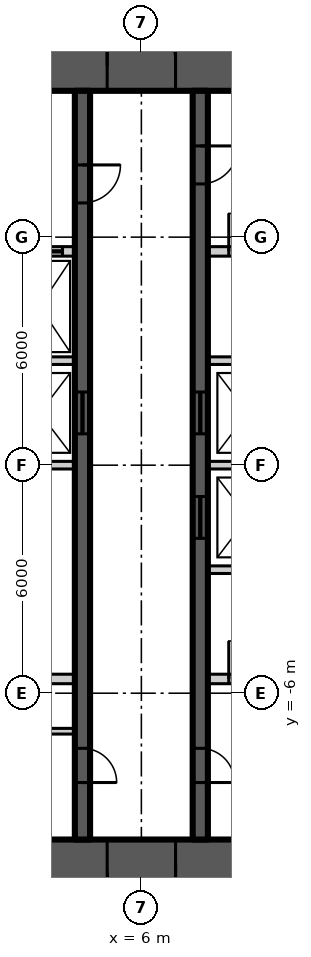
"""IFC4 building model, lengths in metres.
Left out: names, types, materials, properties, quantities, classifications, styles, units other than length and angle.
Written with IfcOpenShell. Run it as: python <this file> out.ifc"""

import sys

from ifc_helpers import new_model, si_unit, direction, frame, frame_2d, origin, place, context, subcontext, project, spatial, rectangle, extrude, element, fill, save


model = new_model("IFC4")
c1 = context("Model", 3, precision=1e-05, world=origin(), true_north=direction((0.0, 1.0)))
c2 = subcontext(c1, "Body", "Model", "MODEL_VIEW")
j1 = project(units=[si_unit("LENGTHUNIT", "METRE"), si_unit("PLANEANGLEUNIT", "RADIAN")], contexts=[c1])
p1 = place(None, origin())
s1 = spatial("IfcSite", under=j1, at=p1, CompositionType="ELEMENT")
p2 = place(p1, origin())
s2 = spatial("IfcBuilding", under=s1, at=p2, CompositionType="ELEMENT")
p3 = place(p2, frame((0.0, 0.0, 294.6)))
s3 = spatial("IfcBuildingStorey", under=s2, at=p3, CompositionType="ELEMENT", Elevation=294.6)
p4 = place(p3, frame((-11.15, 10.5, 0.0), z_axis=(0.0, 0.0, 1.0), x_axis=(1.0, 0.0, 0.0)))
e1 = element("IfcWall", 1, at=p4, inside=s3, PredefinedType="SHEAR", context=c2, shape_type="SweptSolid", body=[
    extrude(rectangle(XDim=22.3, YDim=1.3, at=frame_2d((11.15, 0.0))), origin(), (0.0, 0.0, 1.0), 3.9),
])
p5 = place(p4, frame((4.25, 0.0, 0.0)))
e2 = element("IfcOpeningElement", 2, at=p5, cuts=e1, PredefinedType="OPENING", context=c2, shape_type="SweptSolid", body=[
    extrude(rectangle(XDim=1.8, YDim=2.2, at=frame_2d((0.9, 1.1))), frame((0.0, 0.66, 0.0), z_axis=(0.0, -1.0, 0.0), x_axis=(1.0, 0.0, 0.0)), (0.0, 0.0, 1.0), 1.32),
])
p6 = place(p4, frame((16.25, 0.0, 0.0)))
e3 = element("IfcOpeningElement", 3, at=p6, cuts=e1, PredefinedType="OPENING", context=c2, shape_type="SweptSolid", body=[
    extrude(rectangle(XDim=1.8, YDim=2.2, at=frame_2d((0.9, 1.1))), frame((0.0, 0.66, 0.0), z_axis=(0.0, -1.0, 0.0), x_axis=(1.0, 0.0, 0.0)), (0.0, 0.0, 1.0), 1.32),
])
p7 = place(p3, frame((11.15, -10.5, 0.0), z_axis=(0.0, 0.0, 1.0), x_axis=(-1.0, 0.0, 0.0)))
e4 = element("IfcWall", 4, at=p7, inside=s3, PredefinedType="SHEAR", context=c2, shape_type="SweptSolid", body=[
    extrude(rectangle(XDim=22.3, YDim=1.3, at=frame_2d((11.15, 0.0))), origin(), (0.0, 0.0, 1.0), 3.9),
])
p8 = place(p7, frame((16.25, 0.0, 0.0)))
e5 = element("IfcOpeningElement", 5, at=p8, cuts=e4, PredefinedType="OPENING", context=c2, shape_type="SweptSolid", body=[
    extrude(rectangle(XDim=1.8, YDim=2.2, at=frame_2d((0.9, 1.1))), frame((0.0, 0.66, 0.0), z_axis=(0.0, -1.0, 0.0), x_axis=(1.0, 0.0, 0.0)), (0.0, 0.0, 1.0), 1.32),
])
p9 = place(p7, frame((4.25, 0.0, 0.0)))
e6 = element("IfcOpeningElement", 6, at=p9, cuts=e4, PredefinedType="OPENING", context=c2, shape_type="SweptSolid", body=[
    extrude(rectangle(XDim=1.8, YDim=2.2, at=frame_2d((0.9, 1.1))), frame((0.0, 0.66, 0.0), z_axis=(0.0, -1.0, 0.0), x_axis=(1.0, 0.0, 0.0)), (0.0, 0.0, 1.0), 1.32),
])
p10 = place(p3, frame((7.55, 9.85, 0.0), z_axis=(0.0, 0.0, 1.0), x_axis=(0.0, -1.0, 0.0)))
e7 = element("IfcWall", 7, at=p10, inside=s3, PredefinedType="SHEAR", context=c2, shape_type="SweptSolid", body=[
    extrude(rectangle(XDim=19.7, YDim=0.4, at=frame_2d((9.85, 0.0))), origin(), (0.0, 0.0, 1.0), 3.9),
])
p11 = place(p10, frame((1.45, 0.0, 0.0)))
e8 = element("IfcOpeningElement", 8, at=p11, cuts=e7, PredefinedType="OPENING", context=c2, shape_type="SweptSolid", body=[
    extrude(rectangle(XDim=1.0, YDim=2.2, at=frame_2d((0.5, 1.1))), frame((0.0, 0.21, 0.0), z_axis=(0.0, -1.0, 0.0), x_axis=(1.0, 0.0, 0.0)), (0.0, 0.0, 1.0), 0.42),
])
p12 = place(p10, frame((17.3, 0.0, 0.0)))
e9 = element("IfcOpeningElement", 9, at=p12, cuts=e7, PredefinedType="OPENING", context=c2, shape_type="SweptSolid", body=[
    extrude(rectangle(XDim=0.9, YDim=2.1, at=frame_2d((0.45, 1.05))), frame((0.0, 0.21, 0.0), z_axis=(0.0, -1.0, 0.0), x_axis=(1.0, 0.0, 0.0)), (0.0, 0.0, 1.0), 0.42),
])
p13 = place(p10, frame((7.925, 0.0, 0.0)))
e10 = element("IfcOpeningElement", 10, at=p13, cuts=e7, PredefinedType="OPENING", context=c2, shape_type="SweptSolid", body=[
    extrude(rectangle(XDim=1.1, YDim=2.2, at=frame_2d((0.55, 1.1))), frame((0.0, 0.21, 0.0), z_axis=(0.0, -1.0, 0.0), x_axis=(1.0, 0.0, 0.0)), (0.0, 0.0, 1.0), 0.42),
])
p14 = place(p10, frame((10.675, 0.0, 0.0)))
e11 = element("IfcOpeningElement", 11, at=p14, cuts=e7, PredefinedType="OPENING", context=c2, shape_type="SweptSolid", body=[
    extrude(rectangle(XDim=1.1, YDim=2.2, at=frame_2d((0.55, 1.1))), frame((0.0, 0.21, 0.0), z_axis=(0.0, -1.0, 0.0), x_axis=(1.0, 0.0, 0.0)), (0.0, 0.0, 1.0), 0.42),
])
p15 = place(p3, frame((4.45, 9.85, 0.0), z_axis=(0.0, 0.0, 1.0), x_axis=(0.0, -1.0, 0.0)))
e12 = element("IfcWall", 12, at=p15, inside=s3, PredefinedType="SHEAR", context=c2, shape_type="SweptSolid", body=[
    extrude(rectangle(XDim=19.7, YDim=0.4, at=frame_2d((9.85, 0.0))), origin(), (0.0, 0.0, 1.0), 3.9),
])
p16 = place(p15, frame((1.95, 0.0, 0.0)))
e13 = element("IfcOpeningElement", 13, at=p16, cuts=e12, PredefinedType="OPENING", context=c2, shape_type="SweptSolid", body=[
    extrude(rectangle(XDim=1.0, YDim=2.2, at=frame_2d((0.5, 1.1))), frame((0.0, 0.21, 0.0), z_axis=(0.0, -1.0, 0.0), x_axis=(1.0, 0.0, 0.0)), (0.0, 0.0, 1.0), 0.42),
])
p17 = place(p15, frame((17.3, 0.0, 0.0)))
e14 = element("IfcOpeningElement", 14, at=p17, cuts=e12, PredefinedType="OPENING", context=c2, shape_type="SweptSolid", body=[
    extrude(rectangle(XDim=0.9, YDim=2.1, at=frame_2d((0.45, 1.05))), frame((0.0, 0.21, 0.0), z_axis=(0.0, -1.0, 0.0), x_axis=(1.0, 0.0, 0.0)), (0.0, 0.0, 1.0), 0.42),
])
p18 = place(p15, frame((7.925, 0.0, 0.0)))
e15 = element("IfcOpeningElement", 15, at=p18, cuts=e12, PredefinedType="OPENING", context=c2, shape_type="SweptSolid", body=[
    extrude(rectangle(XDim=1.1, YDim=2.2, at=frame_2d((0.55, 1.1))), frame((0.0, 0.21, 0.0), z_axis=(0.0, -1.0, 0.0), x_axis=(1.0, 0.0, 0.0)), (0.0, 0.0, 1.0), 0.42),
])
p19 = place(p3, frame((2.4, 5.625, 0.0), z_axis=(0.0, 0.0, 1.0), x_axis=(1.0, 0.0, 0.0)))
e16 = element("IfcWall", 16, at=p19, inside=s3, PredefinedType="SOLIDWALL", context=c2, shape_type="SweptSolid", body=[
    extrude(rectangle(XDim=1.85, YDim=0.25, at=frame_2d((0.925, 0.0))), origin(), (0.0, 0.0, 1.0), 3.7),
])
p20 = place(p19, frame((0.325, 0.0, 0.0)))
e17 = element("IfcOpeningElement", 17, at=p20, cuts=e16, PredefinedType="OPENING", context=c2, shape_type="SweptSolid", body=[
    extrude(rectangle(XDim=1.2, YDim=2.2, at=frame_2d((0.6, 1.1))), frame((0.0, 0.135, 0.0), z_axis=(0.0, -1.0, 0.0), x_axis=(1.0, 0.0, 0.0)), (0.0, 0.0, 1.0), 0.27),
])
p21 = place(p3, frame((7.75, 5.625, 0.0), z_axis=(0.0, 0.0, 1.0), x_axis=(1.0, 0.0, 0.0)))
e18 = element("IfcWall", 18, at=p21, inside=s3, PredefinedType="SOLIDWALL", context=c2, shape_type="SweptSolid", body=[
    extrude(rectangle(XDim=2.1, YDim=0.25, at=frame_2d((1.05, 0.0))), origin(), (0.0, 0.0, 1.0), 3.7),
])
p22 = place(p21, frame((0.55, 0.0, 0.0)))
e19 = element("IfcOpeningElement", 19, at=p22, cuts=e18, PredefinedType="OPENING", context=c2, shape_type="SweptSolid", body=[
    extrude(rectangle(XDim=1.0, YDim=2.2, at=frame_2d((0.5, 1.1))), frame((0.0, 0.135, 0.0), z_axis=(0.0, -1.0, 0.0), x_axis=(1.0, 0.0, 0.0)), (0.0, 0.0, 1.0), 0.27),
])
p23 = place(p3, frame((2.4, -5.625, 0.0), z_axis=(0.0, 0.0, 1.0), x_axis=(1.0, 0.0, 0.0)))
e20 = element("IfcWall", 20, at=p23, inside=s3, PredefinedType="SOLIDWALL", context=c2, shape_type="SweptSolid", body=[
    extrude(rectangle(XDim=1.85, YDim=0.25, at=frame_2d((0.925, 0.0))), origin(), (0.0, 0.0, 1.0), 3.7),
])
p24 = place(p3, frame((7.75, -5.625, 0.0), z_axis=(0.0, 0.0, 1.0), x_axis=(1.0, 0.0, 0.0)))
e21 = element("IfcWall", 21, at=p24, inside=s3, PredefinedType="SOLIDWALL", context=c2, shape_type="SweptSolid", body=[
    extrude(rectangle(XDim=2.1, YDim=0.25, at=frame_2d((1.05, 0.0))), origin(), (0.0, 0.0, 1.0), 3.7),
])
p25 = place(p24, frame((0.55, 0.0, 0.0)))
e22 = element("IfcOpeningElement", 22, at=p25, cuts=e21, PredefinedType="OPENING", context=c2, shape_type="SweptSolid", body=[
    extrude(rectangle(XDim=1.0, YDim=2.2, at=frame_2d((0.5, 1.1))), frame((0.0, 0.135, 0.0), z_axis=(0.0, -1.0, 0.0), x_axis=(1.0, 0.0, 0.0)), (0.0, 0.0, 1.0), 0.27),
])
p26 = place(p3, frame((7.75, -2.75, 0.0), z_axis=(0.0, 0.0, 1.0), x_axis=(1.0, 0.0, 0.0)))
e23 = element("IfcWall", 23, at=p26, inside=s3, PredefinedType="SOLIDWALL", context=c2, shape_type="SweptSolid", body=[
    extrude(rectangle(XDim=2.1, YDim=0.2, at=frame_2d((1.05, 0.0))), origin(), (0.0, 0.0, 1.0), 3.7),
])
p27 = place(p3, frame((2.4, 0.0, 0.0), z_axis=(0.0, 0.0, 1.0), x_axis=(1.0, 0.0, 0.0)))
e24 = element("IfcWall", 24, at=p27, inside=s3, PredefinedType="SOLIDWALL", context=c2, shape_type="SweptSolid", body=[
    extrude(rectangle(XDim=1.85, YDim=0.2, at=frame_2d((0.925, 0.0))), origin(), (0.0, 0.0, 1.0), 3.7),
])
p28 = place(p3, frame((7.75, 0.0, 0.0), z_axis=(0.0, 0.0, 1.0), x_axis=(1.0, 0.0, 0.0)))
e25 = element("IfcWall", 25, at=p28, inside=s3, PredefinedType="SOLIDWALL", context=c2, shape_type="SweptSolid", body=[
    extrude(rectangle(XDim=2.1, YDim=0.2, at=frame_2d((1.05, 0.0))), origin(), (0.0, 0.0, 1.0), 3.7),
])
p29 = place(p3, frame((2.4, 2.75, 0.0), z_axis=(0.0, 0.0, 1.0), x_axis=(1.0, 0.0, 0.0)))
e26 = element("IfcWall", 26, at=p29, inside=s3, PredefinedType="SOLIDWALL", context=c2, shape_type="SweptSolid", body=[
    extrude(rectangle(XDim=1.85, YDim=0.2, at=frame_2d((0.925, 0.0))), origin(), (0.0, 0.0, 1.0), 3.7),
])
p30 = place(p3, frame((7.75, 2.75, 0.0), z_axis=(0.0, 0.0, 1.0), x_axis=(1.0, 0.0, 0.0)))
e27 = element("IfcWall", 27, at=p30, inside=s3, PredefinedType="SOLIDWALL", context=c2, shape_type="SweptSolid", body=[
    extrude(rectangle(XDim=2.1, YDim=0.2, at=frame_2d((1.05, 0.0))), origin(), (0.0, 0.0, 1.0), 3.7),
])
p31 = place(p3, frame((2.4, -7.0, 0.0), z_axis=(0.0, 0.0, 1.0), x_axis=(1.0, 0.0, 0.0)))
e28 = element("IfcWall", 28, at=p31, inside=s3, PredefinedType="SOLIDWALL", context=c2, shape_type="SweptSolid", body=[
    extrude(rectangle(XDim=1.85, YDim=0.15, at=frame_2d((0.925, 0.0))), origin(), (0.0, 0.0, 1.0), 3.77),
])
p32 = place(p31, frame((0.1, 0.0, 0.0)))
e29 = element("IfcOpeningElement", 29, at=p32, cuts=e28, PredefinedType="OPENING", context=c2, shape_type="SweptSolid", body=[
    extrude(rectangle(XDim=0.9, YDim=2.1, at=frame_2d((0.45, 1.05))), frame((0.0, 0.085, 0.0), z_axis=(0.0, -1.0, 0.0), x_axis=(1.0, 0.0, 0.0)), (0.0, 0.0, 1.0), 0.17),
])
p33 = place(p6, origin())
e30 = element("IfcDoor", 30, at=p33, inside=s3, OperationType="DOUBLE_DOOR_DOUBLE_SWING", PredefinedType="DOOR", context=c2, shape_type="SweptSolid", body=[
    extrude(rectangle(XDim=1.8, YDim=2.2, at=frame_2d((0.9, 1.1))), frame((0.0, 0.025, 0.0), z_axis=(0.0, -1.0, 0.0), x_axis=(1.0, 0.0, 0.0)), (0.0, 0.0, 1.0), 0.05),
])
fill(e3, e30)
p34 = place(p9, origin())
e31 = element("IfcDoor", 31, at=p34, inside=s3, OperationType="DOUBLE_DOOR_DOUBLE_SWING", PredefinedType="DOOR", context=c2, shape_type="SweptSolid", body=[
    extrude(rectangle(XDim=1.8, YDim=2.2, at=frame_2d((0.9, 1.1))), frame((0.0, 0.025, 0.0), z_axis=(0.0, -1.0, 0.0), x_axis=(1.0, 0.0, 0.0)), (0.0, 0.0, 1.0), 0.05),
])
fill(e6, e31)
p35 = place(p11, origin())
e32 = element("IfcDoor", 32, at=p35, inside=s3, OperationType="SINGLE_SWING_LEFT", PredefinedType="DOOR", context=c2, shape_type="SweptSolid", body=[
    extrude(rectangle(XDim=1.0, YDim=2.2, at=frame_2d((0.5, 1.1))), frame((0.0, 0.025, 0.0), z_axis=(0.0, -1.0, 0.0), x_axis=(1.0, 0.0, 0.0)), (0.0, 0.0, 1.0), 0.05),
])
fill(e8, e32)
p36 = place(p16, origin())
e33 = element("IfcDoor", 33, at=p36, inside=s3, OperationType="SINGLE_SWING_LEFT", PredefinedType="DOOR", context=c2, shape_type="SweptSolid", body=[
    extrude(rectangle(XDim=1.0, YDim=2.2, at=frame_2d((0.5, 1.1))), frame((0.0, 0.025, 0.0), z_axis=(0.0, -1.0, 0.0), x_axis=(1.0, 0.0, 0.0)), (0.0, 0.0, 1.0), 0.05),
])
fill(e13, e33)
p37 = place(p12, origin())
e34 = element("IfcDoor", 34, at=p37, inside=s3, OperationType="SINGLE_SWING_RIGHT", PredefinedType="DOOR", context=c2, shape_type="SweptSolid", body=[
    extrude(rectangle(XDim=0.9, YDim=2.1, at=frame_2d((0.45, 1.05))), frame((0.0, 0.025, 0.0), z_axis=(0.0, -1.0, 0.0), x_axis=(1.0, 0.0, 0.0)), (0.0, 0.0, 1.0), 0.05),
])
fill(e9, e34)
p38 = place(p17, origin())
e35 = element("IfcDoor", 35, at=p38, inside=s3, OperationType="SINGLE_SWING_RIGHT", PredefinedType="DOOR", context=c2, shape_type="SweptSolid", body=[
    extrude(rectangle(XDim=0.9, YDim=2.1, at=frame_2d((0.45, 1.05))), frame((0.0, 0.025, 0.0), z_axis=(0.0, -1.0, 0.0), x_axis=(1.0, 0.0, 0.0)), (0.0, 0.0, 1.0), 0.05),
])
fill(e14, e35)
p39 = place(p13, origin())
e36 = element("IfcDoor", 36, at=p39, inside=s3, OperationType="SLIDING_TO_LEFT", PredefinedType="DOOR", context=c2, shape_type="SweptSolid", body=[
    extrude(rectangle(XDim=1.1, YDim=2.2, at=frame_2d((0.55, 1.1))), frame((0.0, 0.025, 0.0), z_axis=(0.0, -1.0, 0.0), x_axis=(1.0, 0.0, 0.0)), (0.0, 0.0, 1.0), 0.05),
])
fill(e10, e36)
p40 = place(p14, origin())
e37 = element("IfcDoor", 37, at=p40, inside=s3, OperationType="SLIDING_TO_LEFT", PredefinedType="DOOR", context=c2, shape_type="SweptSolid", body=[
    extrude(rectangle(XDim=1.1, YDim=2.2, at=frame_2d((0.55, 1.1))), frame((0.0, 0.025, 0.0), z_axis=(0.0, -1.0, 0.0), x_axis=(1.0, 0.0, 0.0)), (0.0, 0.0, 1.0), 0.05),
])
fill(e11, e37)
p41 = place(p18, origin())
e38 = element("IfcDoor", 38, at=p41, inside=s3, OperationType="SLIDING_TO_LEFT", PredefinedType="DOOR", context=c2, shape_type="SweptSolid", body=[
    extrude(rectangle(XDim=1.1, YDim=2.2, at=frame_2d((0.55, 1.1))), frame((0.0, 0.025, 0.0), z_axis=(0.0, -1.0, 0.0), x_axis=(1.0, 0.0, 0.0)), (0.0, 0.0, 1.0), 0.05),
])
fill(e15, e38)
p42 = place(p20, origin())
e39 = element("IfcDoor", 39, at=p42, inside=s3, OperationType="SLIDING_TO_LEFT", PredefinedType="DOOR", context=c2, shape_type="SweptSolid", body=[
    extrude(rectangle(XDim=1.2, YDim=2.2, at=frame_2d((0.6, 1.1))), frame((0.0, 0.025, 0.0), z_axis=(0.0, -1.0, 0.0), x_axis=(1.0, 0.0, 0.0)), (0.0, 0.0, 1.0), 0.05),
])
fill(e17, e39)
p43 = place(p22, origin())
e40 = element("IfcDoor", 40, at=p43, inside=s3, OperationType="SINGLE_SWING_LEFT", PredefinedType="DOOR", context=c2, shape_type="SweptSolid", body=[
    extrude(rectangle(XDim=1.0, YDim=2.2, at=frame_2d((0.5, 1.1))), frame((0.0, 0.025, 0.0), z_axis=(0.0, -1.0, 0.0), x_axis=(1.0, 0.0, 0.0)), (0.0, 0.0, 1.0), 0.05),
])
fill(e19, e40)
p44 = place(p25, origin())
e41 = element("IfcDoor", 41, at=p44, inside=s3, OperationType="SINGLE_SWING_LEFT", PredefinedType="DOOR", context=c2, shape_type="SweptSolid", body=[
    extrude(rectangle(XDim=1.0, YDim=2.2, at=frame_2d((0.5, 1.1))), frame((0.0, 0.025, 0.0), z_axis=(0.0, -1.0, 0.0), x_axis=(1.0, 0.0, 0.0)), (0.0, 0.0, 1.0), 0.05),
])
fill(e22, e41)
save(model, sys.argv[1])
